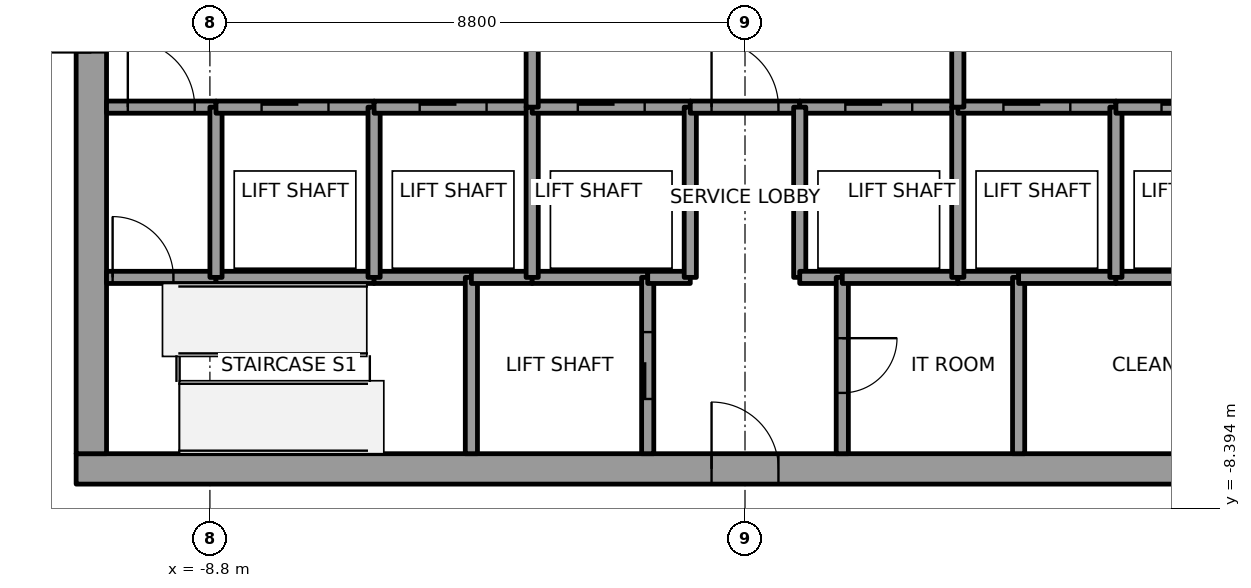
"""IFC4 building model, lengths in metres.
Left out: names, types, materials, properties, quantities, classifications, styles, units other than length and angle.
Written with IfcOpenShell. Run it as: python <this file> out.ifc"""

import sys

from ifc_helpers import new_model, si_unit, direction, frame, frame_2d, origin, place, context, subcontext, project, spatial, rectangle, extrude, element, fill, save


model = new_model("IFC4")
c1 = context("Model", 3, precision=1e-05, world=origin(), true_north=direction((0.0, 1.0)))
c2 = subcontext(c1, "Body", "Model", "MODEL_VIEW")
j1 = project(units=[si_unit("LENGTHUNIT", "METRE"), si_unit("PLANEANGLEUNIT", "RADIAN")], contexts=[c1])
p1 = place(None, origin())
s1 = spatial("IfcSite", under=j1, at=p1, CompositionType="ELEMENT")
p2 = place(p1, origin())
s2 = spatial("IfcBuilding", under=s1, at=p2, CompositionType="ELEMENT")
p3 = place(p2, frame((0.0, 0.0, 267.0)))
s3 = spatial("IfcBuildingStorey", under=s2, at=p3, CompositionType="ELEMENT", Elevation=267.0)
p4 = place(p3, frame((-11.0, -7.75, 0.0), z_axis=(0.0, 0.0, 1.0), x_axis=(1.0, 0.0, 0.0)))
e1 = element("IfcWall", 1, at=p4, inside=s3, PredefinedType="SHEAR", context=c2, shape_type="SweptSolid", body=[
    extrude(rectangle(XDim=22.0, YDim=0.5, at=frame_2d((11.0, 0.0))), origin(), (0.0, 0.0, 1.0), 4.0),
])
p5 = place(p4, frame((10.45, 0.0, 0.0)))
e2 = element("IfcOpeningElement", 2, at=p5, cuts=e1, PredefinedType="OPENING", context=c2, shape_type="SweptSolid", body=[
    extrude(rectangle(XDim=1.1, YDim=2.1, at=frame_2d((0.55, 1.05))), frame((0.0, 0.25, 0.0), z_axis=(0.0, -1.0, 0.0), x_axis=(1.0, 0.0, 0.0)), (0.0, 0.0, 1.0), 0.5),
])
p6 = place(p3, frame((-10.75, -7.5, 0.0), z_axis=(0.0, 0.0, 1.0), x_axis=(0.0, 1.0, 0.0)))
e3 = element("IfcWall", 3, at=p6, inside=s3, PredefinedType="SHEAR", context=c2, shape_type="SweptSolid", body=[
    extrude(rectangle(XDim=15.0, YDim=0.5, at=frame_2d((7.5, 0.0))), origin(), (0.0, 0.0, 1.0), 4.0),
])
p7 = place(p6, frame((6.6, 0.0, 0.0)))
e4 = element("IfcOpeningElement", 4, at=p7, cuts=e3, PredefinedType="OPENING", context=c2, shape_type="SweptSolid", body=[
    extrude(rectangle(XDim=1.8, YDim=2.1, at=frame_2d((0.9, 1.05))), frame((0.0, 0.25, 0.0), z_axis=(0.0, -1.0, 0.0), x_axis=(1.0, 0.0, 0.0)), (0.0, 0.0, 1.0), 0.5),
])
p8 = place(p3, frame((-10.5, -4.6, 0.0), z_axis=(0.0, 0.0, 1.0), x_axis=(1.0, 0.0, 0.0)))
e5 = element("IfcWall", 5, at=p8, inside=s3, PredefinedType="SOLIDWALL", context=c2, shape_type="SweptSolid", body=[
    extrude(rectangle(XDim=1.8, YDim=0.2, at=frame_2d((0.9, 0.0))), origin(), (0.0, 0.0, 1.0), 3.85),
])
p9 = place(p8, frame((0.1, 0.0, 0.0)))
e6 = element("IfcOpeningElement", 6, at=p9, cuts=e5, PredefinedType="OPENING", context=c2, shape_type="SweptSolid", body=[
    extrude(rectangle(XDim=1.0, YDim=2.1, at=frame_2d((0.5, 1.05))), frame((0.0, 0.1, 0.0), z_axis=(0.0, -1.0, 0.0), x_axis=(1.0, 0.0, 0.0)), (0.0, 0.0, 1.0), 0.2),
])
p10 = place(p3, frame((-10.5, -1.8, 0.0), z_axis=(0.0, 0.0, 1.0), x_axis=(1.0, 0.0, 0.0)))
e7 = element("IfcWall", 7, at=p10, inside=s3, PredefinedType="SOLIDWALL", context=c2, shape_type="SweptSolid", body=[
    extrude(rectangle(XDim=1.8, YDim=0.2, at=frame_2d((0.9, 0.0))), origin(), (0.0, 0.0, 1.0), 3.85),
])
p11 = place(p10, frame((0.35, 0.0, 0.0)))
e8 = element("IfcOpeningElement", 8, at=p11, cuts=e7, PredefinedType="OPENING", context=c2, shape_type="SweptSolid", body=[
    extrude(rectangle(XDim=1.1, YDim=2.1, at=frame_2d((0.55, 1.05))), frame((0.0, 0.1, 0.0), z_axis=(0.0, -1.0, 0.0), x_axis=(1.0, 0.0, 0.0)), (0.0, 0.0, 1.0), 0.2),
])
p12 = place(p3, frame((-8.7, -4.6, 0.0), z_axis=(0.0, 0.0, 1.0), x_axis=(1.0, 0.0, 0.0)))
e9 = element("IfcWall", 9, at=p12, inside=s3, PredefinedType="SOLIDWALL", context=c2, shape_type="SweptSolid", body=[
    extrude(rectangle(XDim=2.6, YDim=0.2, at=frame_2d((1.3, 0.0))), origin(), (0.0, 0.0, 1.0), 3.85),
])
p13 = place(p3, frame((-8.7, -4.6, 0.0), z_axis=(0.0, 0.0, 1.0), x_axis=(0.0, 1.0, 0.0)))
e10 = element("IfcWall", 10, at=p13, inside=s3, PredefinedType="SOLIDWALL", context=c2, shape_type="SweptSolid", body=[
    extrude(rectangle(XDim=2.8, YDim=0.2, at=frame_2d((1.4, 0.0))), origin(), (0.0, 0.0, 1.0), 3.85),
])
p14 = place(p3, frame((-8.7, -1.8, 0.0), z_axis=(0.0, 0.0, 1.0), x_axis=(1.0, 0.0, 0.0)))
e11 = element("IfcWall", 11, at=p14, inside=s3, PredefinedType="SOLIDWALL", context=c2, shape_type="SweptSolid", body=[
    extrude(rectangle(XDim=2.6, YDim=0.2, at=frame_2d((1.3, 0.0))), origin(), (0.0, 0.0, 1.0), 3.85),
])
p15 = place(p14, frame((0.75, 0.0, 0.0)))
e12 = element("IfcOpeningElement", 12, at=p15, cuts=e11, PredefinedType="OPENING", context=c2, shape_type="SweptSolid", body=[
    extrude(rectangle(XDim=1.1, YDim=2.1, at=frame_2d((0.55, 1.05))), frame((0.0, 0.1, 0.0), z_axis=(0.0, -1.0, 0.0), x_axis=(1.0, 0.0, 0.0)), (0.0, 0.0, 1.0), 0.2),
])
p16 = place(p3, frame((-6.1, -4.6, 0.0), z_axis=(0.0, 0.0, 1.0), x_axis=(1.0, 0.0, 0.0)))
e13 = element("IfcWall", 13, at=p16, inside=s3, PredefinedType="SOLIDWALL", context=c2, shape_type="SweptSolid", body=[
    extrude(rectangle(XDim=1.6, YDim=0.2, at=frame_2d((0.8, 0.0))), origin(), (0.0, 0.0, 1.0), 3.85),
])
p17 = place(p3, frame((-6.1, -4.6, 0.0), z_axis=(0.0, 0.0, 1.0), x_axis=(0.0, 1.0, 0.0)))
e14 = element("IfcWall", 14, at=p17, inside=s3, PredefinedType="SOLIDWALL", context=c2, shape_type="SweptSolid", body=[
    extrude(rectangle(XDim=2.8, YDim=0.2, at=frame_2d((1.4, 0.0))), origin(), (0.0, 0.0, 1.0), 3.85),
])
p18 = place(p3, frame((-6.1, -1.8, 0.0), z_axis=(0.0, 0.0, 1.0), x_axis=(1.0, 0.0, 0.0)))
e15 = element("IfcWall", 15, at=p18, inside=s3, PredefinedType="SOLIDWALL", context=c2, shape_type="SweptSolid", body=[
    extrude(rectangle(XDim=2.6, YDim=0.2, at=frame_2d((1.3, 0.0))), origin(), (0.0, 0.0, 1.0), 3.85),
])
p19 = place(p18, frame((0.75, 0.0, 0.0)))
e16 = element("IfcOpeningElement", 16, at=p19, cuts=e15, PredefinedType="OPENING", context=c2, shape_type="SweptSolid", body=[
    extrude(rectangle(XDim=1.1, YDim=2.1, at=frame_2d((0.55, 1.05))), frame((0.0, 0.1, 0.0), z_axis=(0.0, -1.0, 0.0), x_axis=(1.0, 0.0, 0.0)), (0.0, 0.0, 1.0), 0.2),
])
p20 = place(p3, frame((-4.5, -4.6, 0.0), z_axis=(0.0, 0.0, 1.0), x_axis=(0.0, -1.0, 0.0)))
e17 = element("IfcWall", 17, at=p20, inside=s3, PredefinedType="SOLIDWALL", context=c2, shape_type="SweptSolid", body=[
    extrude(rectangle(XDim=2.9, YDim=0.2, at=frame_2d((1.45, 0.0))), origin(), (0.0, 0.0, 1.0), 3.85),
])
p21 = place(p3, frame((-4.5, -4.6, 0.0), z_axis=(0.0, 0.0, 1.0), x_axis=(1.0, 0.0, 0.0)))
e18 = element("IfcWall", 18, at=p21, inside=s3, PredefinedType="SOLIDWALL", context=c2, shape_type="SweptSolid", body=[
    extrude(rectangle(XDim=1.0, YDim=0.2, at=frame_2d((0.5, 0.0))), origin(), (0.0, 0.0, 1.0), 3.85),
])
p22 = place(p3, frame((-3.5, -4.6, 0.0), z_axis=(0.0, 0.0, 1.0), x_axis=(1.0, 0.0, 0.0)))
e19 = element("IfcWall", 19, at=p22, inside=s3, PredefinedType="SOLIDWALL", context=c2, shape_type="SweptSolid", body=[
    extrude(rectangle(XDim=1.9, YDim=0.2, at=frame_2d((0.95, 0.0))), origin(), (0.0, 0.0, 1.0), 3.85),
])
p23 = place(p3, frame((-3.5, -4.6, 0.0), z_axis=(0.0, 0.0, 1.0), x_axis=(0.0, 1.0, 0.0)))
e20 = element("IfcWall", 20, at=p23, inside=s3, PredefinedType="SOLIDWALL", context=c2, shape_type="SweptSolid", body=[
    extrude(rectangle(XDim=2.8, YDim=0.2, at=frame_2d((1.4, 0.0))), origin(), (0.0, 0.0, 1.0), 3.85),
])
p24 = place(p3, frame((-3.5, -1.8, 0.0), z_axis=(0.0, 0.0, 1.0), x_axis=(1.0, 0.0, 0.0)))
e21 = element("IfcWall", 21, at=p24, inside=s3, PredefinedType="SOLIDWALL", context=c2, shape_type="SweptSolid", body=[
    extrude(rectangle(XDim=2.6, YDim=0.2, at=frame_2d((1.3, 0.0))), origin(), (0.0, 0.0, 1.0), 3.85),
])
p25 = place(p24, frame((0.75, 0.0, 0.0)))
e22 = element("IfcOpeningElement", 22, at=p25, cuts=e21, PredefinedType="OPENING", context=c2, shape_type="SweptSolid", body=[
    extrude(rectangle(XDim=1.1, YDim=2.1, at=frame_2d((0.55, 1.05))), frame((0.0, 0.1, 0.0), z_axis=(0.0, -1.0, 0.0), x_axis=(1.0, 0.0, 0.0)), (0.0, 0.0, 1.0), 0.2),
])
p26 = place(p3, frame((-3.5, 1.8, 0.0), z_axis=(0.0, 0.0, 1.0), x_axis=(0.0, -1.0, 0.0)))
e23 = element("IfcWall", 23, at=p26, inside=s3, PredefinedType="SOLIDWALL", context=c2, shape_type="SweptSolid", body=[
    extrude(rectangle(XDim=3.6, YDim=0.2, at=frame_2d((1.8, 0.0))), origin(), (0.0, 0.0, 1.0), 3.85),
])
p27 = place(p26, frame((1.05, 0.0, 0.0)))
e24 = element("IfcOpeningElement", 24, at=p27, cuts=e23, PredefinedType="OPENING", context=c2, shape_type="SweptSolid", body=[
    extrude(rectangle(XDim=1.5, YDim=2.1, at=frame_2d((0.75, 1.05))), frame((0.0, 0.1, 0.0), z_axis=(0.0, -1.0, 0.0), x_axis=(1.0, 0.0, 0.0)), (0.0, 0.0, 1.0), 0.2),
])
p28 = place(p3, frame((-1.6, -7.5, 0.0), z_axis=(0.0, 0.0, 1.0), x_axis=(0.0, 1.0, 0.0)))
e25 = element("IfcWall", 25, at=p28, inside=s3, PredefinedType="SOLIDWALL", context=c2, shape_type="SweptSolid", body=[
    extrude(rectangle(XDim=2.9, YDim=0.2, at=frame_2d((1.45, 0.0))), origin(), (0.0, 0.0, 1.0), 3.85),
])
p29 = place(p28, frame((0.9, 0.0, 0.0)))
e26 = element("IfcOpeningElement", 26, at=p29, cuts=e25, PredefinedType="OPENING", context=c2, shape_type="SweptSolid", body=[
    extrude(rectangle(XDim=1.1, YDim=2.1, at=frame_2d((0.55, 1.05))), frame((0.0, 0.1, 0.0), z_axis=(0.0, -1.0, 0.0), x_axis=(1.0, 0.0, 0.0)), (0.0, 0.0, 1.0), 0.2),
])
p30 = place(p3, frame((-1.6, -4.6, 0.0), z_axis=(0.0, 0.0, 1.0), x_axis=(1.0, 0.0, 0.0)))
e27 = element("IfcWall", 27, at=p30, inside=s3, PredefinedType="SOLIDWALL", context=c2, shape_type="SweptSolid", body=[
    extrude(rectangle(XDim=0.7, YDim=0.2, at=frame_2d((0.35, 0.0))), origin(), (0.0, 0.0, 1.0), 3.85),
])
p31 = place(p3, frame((-0.9, -4.6, 0.0), z_axis=(0.0, 0.0, 1.0), x_axis=(0.0, 1.0, 0.0)))
e28 = element("IfcWall", 28, at=p31, inside=s3, PredefinedType="SOLIDWALL", context=c2, shape_type="SweptSolid", body=[
    extrude(rectangle(XDim=2.8, YDim=0.2, at=frame_2d((1.4, 0.0))), origin(), (0.0, 0.0, 1.0), 3.85),
])
p32 = place(p3, frame((-0.9, -1.8, 0.0), z_axis=(0.0, 0.0, 1.0), x_axis=(1.0, 0.0, 0.0)))
e29 = element("IfcWall", 29, at=p32, inside=s3, PredefinedType="SOLIDWALL", context=c2, shape_type="SweptSolid", body=[
    extrude(rectangle(XDim=1.8, YDim=0.2, at=frame_2d((0.9, 0.0))), origin(), (0.0, 0.0, 1.0), 3.85),
])
p33 = place(p32, frame((0.35, 0.0, 0.0)))
e30 = element("IfcOpeningElement", 30, at=p33, cuts=e29, PredefinedType="OPENING", context=c2, shape_type="SweptSolid", body=[
    extrude(rectangle(XDim=1.1, YDim=2.1, at=frame_2d((0.55, 1.05))), frame((0.0, 0.1, 0.0), z_axis=(0.0, -1.0, 0.0), x_axis=(1.0, 0.0, 0.0)), (0.0, 0.0, 1.0), 0.2),
])
p34 = place(p3, frame((0.9, -1.8, 0.0), z_axis=(0.0, 0.0, 1.0), x_axis=(1.0, 0.0, 0.0)))
e31 = element("IfcWall", 31, at=p34, inside=s3, PredefinedType="SOLIDWALL", context=c2, shape_type="SweptSolid", body=[
    extrude(rectangle(XDim=2.6, YDim=0.2, at=frame_2d((1.3, 0.0))), origin(), (0.0, 0.0, 1.0), 3.85),
])
p35 = place(p34, frame((0.75, 0.0, 0.0)))
e32 = element("IfcOpeningElement", 32, at=p35, cuts=e31, PredefinedType="OPENING", context=c2, shape_type="SweptSolid", body=[
    extrude(rectangle(XDim=1.1, YDim=2.1, at=frame_2d((0.55, 1.05))), frame((0.0, 0.1, 0.0), z_axis=(0.0, -1.0, 0.0), x_axis=(1.0, 0.0, 0.0)), (0.0, 0.0, 1.0), 0.2),
])
p36 = place(p3, frame((0.9, -1.8, 0.0), z_axis=(0.0, 0.0, 1.0), x_axis=(0.0, -1.0, 0.0)))
e33 = element("IfcWall", 33, at=p36, inside=s3, PredefinedType="SOLIDWALL", context=c2, shape_type="SweptSolid", body=[
    extrude(rectangle(XDim=2.8, YDim=0.2, at=frame_2d((1.4, 0.0))), origin(), (0.0, 0.0, 1.0), 3.85),
])
p37 = place(p3, frame((0.9, -4.6, 0.0), z_axis=(0.0, 0.0, 1.0), x_axis=(1.0, 0.0, 0.0)))
e34 = element("IfcWall", 34, at=p37, inside=s3, PredefinedType="SOLIDWALL", context=c2, shape_type="SweptSolid", body=[
    extrude(rectangle(XDim=0.7, YDim=0.2, at=frame_2d((0.35, 0.0))), origin(), (0.0, 0.0, 1.0), 3.85),
])
p38 = place(p3, frame((1.6, -4.6, 0.0), z_axis=(0.0, 0.0, 1.0), x_axis=(0.0, -1.0, 0.0)))
e35 = element("IfcWall", 35, at=p38, inside=s3, PredefinedType="SOLIDWALL", context=c2, shape_type="SweptSolid", body=[
    extrude(rectangle(XDim=2.9, YDim=0.2, at=frame_2d((1.45, 0.0))), origin(), (0.0, 0.0, 1.0), 3.85),
])
p39 = place(p38, frame((1.0, 0.0, 0.0)))
e36 = element("IfcOpeningElement", 36, at=p39, cuts=e35, PredefinedType="OPENING", context=c2, shape_type="SweptSolid", body=[
    extrude(rectangle(XDim=0.9, YDim=2.1, at=frame_2d((0.45, 1.05))), frame((0.0, 0.1, 0.0), z_axis=(0.0, -1.0, 0.0), x_axis=(1.0, 0.0, 0.0)), (0.0, 0.0, 1.0), 0.2),
])
p40 = place(p3, frame((3.5, -4.6, 0.0), z_axis=(0.0, 0.0, 1.0), x_axis=(-1.0, 0.0, 0.0)))
e37 = element("IfcWall", 37, at=p40, inside=s3, PredefinedType="SOLIDWALL", context=c2, shape_type="SweptSolid", body=[
    extrude(rectangle(XDim=1.9, YDim=0.2, at=frame_2d((0.95, 0.0))), origin(), (0.0, 0.0, 1.0), 3.85),
])
p41 = place(p3, frame((4.5, -4.6, 0.0), z_axis=(0.0, 0.0, 1.0), x_axis=(-1.0, 0.0, 0.0)))
e38 = element("IfcWall", 38, at=p41, inside=s3, PredefinedType="SOLIDWALL", context=c2, shape_type="SweptSolid", body=[
    extrude(rectangle(XDim=1.0, YDim=0.2, at=frame_2d((0.5, 0.0))), origin(), (0.0, 0.0, 1.0), 3.85),
])
p42 = place(p3, frame((3.5, -4.6, 0.0), z_axis=(0.0, 0.0, 1.0), x_axis=(0.0, 1.0, 0.0)))
e39 = element("IfcWall", 39, at=p42, inside=s3, PredefinedType="SOLIDWALL", context=c2, shape_type="SweptSolid", body=[
    extrude(rectangle(XDim=2.8, YDim=0.2, at=frame_2d((1.4, 0.0))), origin(), (0.0, 0.0, 1.0), 3.85),
])
p43 = place(p3, frame((3.5, -1.8, 0.0), z_axis=(0.0, 0.0, 1.0), x_axis=(1.0, 0.0, 0.0)))
e40 = element("IfcWall", 40, at=p43, inside=s3, PredefinedType="SOLIDWALL", context=c2, shape_type="SweptSolid", body=[
    extrude(rectangle(XDim=2.6, YDim=0.2, at=frame_2d((1.3, 0.0))), origin(), (0.0, 0.0, 1.0), 3.85),
])
p44 = place(p43, frame((0.75, 0.0, 0.0)))
e41 = element("IfcOpeningElement", 41, at=p44, cuts=e40, PredefinedType="OPENING", context=c2, shape_type="SweptSolid", body=[
    extrude(rectangle(XDim=1.1, YDim=2.1, at=frame_2d((0.55, 1.05))), frame((0.0, 0.1, 0.0), z_axis=(0.0, -1.0, 0.0), x_axis=(1.0, 0.0, 0.0)), (0.0, 0.0, 1.0), 0.2),
])
p45 = place(p3, frame((3.5, -1.8, 0.0), z_axis=(0.0, 0.0, 1.0), x_axis=(0.0, 1.0, 0.0)))
e42 = element("IfcWall", 42, at=p45, inside=s3, PredefinedType="SOLIDWALL", context=c2, shape_type="SweptSolid", body=[
    extrude(rectangle(XDim=3.6, YDim=0.2, at=frame_2d((1.8, 0.0))), origin(), (0.0, 0.0, 1.0), 3.85),
])
p46 = place(p45, frame((1.05, 0.0, 0.0)))
e43 = element("IfcOpeningElement", 43, at=p46, cuts=e42, PredefinedType="OPENING", context=c2, shape_type="SweptSolid", body=[
    extrude(rectangle(XDim=1.5, YDim=2.1, at=frame_2d((0.75, 1.05))), frame((0.0, 0.1, 0.0), z_axis=(0.0, -1.0, 0.0), x_axis=(1.0, 0.0, 0.0)), (0.0, 0.0, 1.0), 0.2),
])
p47 = place(p3, frame((4.5, -4.6, 0.0), z_axis=(0.0, 0.0, 1.0), x_axis=(0.0, -1.0, 0.0)))
e44 = element("IfcWall", 44, at=p47, inside=s3, PredefinedType="SOLIDWALL", context=c2, shape_type="SweptSolid", body=[
    extrude(rectangle(XDim=2.9, YDim=0.2, at=frame_2d((1.45, 0.0))), origin(), (0.0, 0.0, 1.0), 3.85),
])
p48 = place(p3, frame((6.1, -4.6, 0.0), z_axis=(0.0, 0.0, 1.0), x_axis=(-1.0, 0.0, 0.0)))
e45 = element("IfcWall", 45, at=p48, inside=s3, PredefinedType="SOLIDWALL", context=c2, shape_type="SweptSolid", body=[
    extrude(rectangle(XDim=1.6, YDim=0.2, at=frame_2d((0.8, 0.0))), origin(), (0.0, 0.0, 1.0), 3.85),
])
p49 = place(p3, frame((8.7, -4.6, 0.0), z_axis=(0.0, 0.0, 1.0), x_axis=(-1.0, 0.0, 0.0)))
e46 = element("IfcWall", 46, at=p49, inside=s3, PredefinedType="SOLIDWALL", context=c2, shape_type="SweptSolid", body=[
    extrude(rectangle(XDim=2.6, YDim=0.2, at=frame_2d((1.3, 0.0))), origin(), (0.0, 0.0, 1.0), 3.85),
])
p50 = place(p3, frame((6.1, -4.6, 0.0), z_axis=(0.0, 0.0, 1.0), x_axis=(0.0, 1.0, 0.0)))
e47 = element("IfcWall", 47, at=p50, inside=s3, PredefinedType="SOLIDWALL", context=c2, shape_type="SweptSolid", body=[
    extrude(rectangle(XDim=2.8, YDim=0.2, at=frame_2d((1.4, 0.0))), origin(), (0.0, 0.0, 1.0), 3.85),
])
p51 = place(p3, frame((6.1, -1.8, 0.0), z_axis=(0.0, 0.0, 1.0), x_axis=(1.0, 0.0, 0.0)))
e48 = element("IfcWall", 48, at=p51, inside=s3, PredefinedType="SOLIDWALL", context=c2, shape_type="SweptSolid", body=[
    extrude(rectangle(XDim=2.6, YDim=0.2, at=frame_2d((1.3, 0.0))), origin(), (0.0, 0.0, 1.0), 3.85),
])
p52 = place(p51, frame((0.75, 0.0, 0.0)))
e49 = element("IfcOpeningElement", 49, at=p52, cuts=e48, PredefinedType="OPENING", context=c2, shape_type="SweptSolid", body=[
    extrude(rectangle(XDim=1.1, YDim=2.1, at=frame_2d((0.55, 1.05))), frame((0.0, 0.1, 0.0), z_axis=(0.0, -1.0, 0.0), x_axis=(1.0, 0.0, 0.0)), (0.0, 0.0, 1.0), 0.2),
])
p53 = place(p15, origin())
e50 = element("IfcDoor", 50, at=p53, inside=s3, OperationType="SLIDING_TO_LEFT", PredefinedType="DOOR", context=c2, shape_type="SweptSolid", body=[
    extrude(rectangle(XDim=1.1, YDim=2.1, at=frame_2d((0.55, 1.05))), frame((0.0, 0.025, 0.0), z_axis=(0.0, -1.0, 0.0), x_axis=(1.0, 0.0, 0.0)), (0.0, 0.0, 1.0), 0.05),
])
fill(e12, e50)
p54 = place(p19, origin())
e51 = element("IfcDoor", 51, at=p54, inside=s3, OperationType="SLIDING_TO_LEFT", PredefinedType="DOOR", context=c2, shape_type="SweptSolid", body=[
    extrude(rectangle(XDim=1.1, YDim=2.1, at=frame_2d((0.55, 1.05))), frame((0.0, 0.025, 0.0), z_axis=(0.0, -1.0, 0.0), x_axis=(1.0, 0.0, 0.0)), (0.0, 0.0, 1.0), 0.05),
])
fill(e16, e51)
p55 = place(p25, origin())
e52 = element("IfcDoor", 52, at=p55, inside=s3, OperationType="SLIDING_TO_LEFT", PredefinedType="DOOR", context=c2, shape_type="SweptSolid", body=[
    extrude(rectangle(XDim=1.1, YDim=2.1, at=frame_2d((0.55, 1.05))), frame((0.0, 0.025, 0.0), z_axis=(0.0, -1.0, 0.0), x_axis=(1.0, 0.0, 0.0)), (0.0, 0.0, 1.0), 0.05),
])
fill(e22, e52)
p56 = place(p35, origin())
e53 = element("IfcDoor", 53, at=p56, inside=s3, OperationType="SLIDING_TO_RIGHT", PredefinedType="DOOR", context=c2, shape_type="SweptSolid", body=[
    extrude(rectangle(XDim=1.1, YDim=2.1, at=frame_2d((0.55, 1.05))), frame((0.0, 0.025, 0.0), z_axis=(0.0, -1.0, 0.0), x_axis=(1.0, 0.0, 0.0)), (0.0, 0.0, 1.0), 0.05),
])
fill(e32, e53)
p57 = place(p44, origin())
e54 = element("IfcDoor", 54, at=p57, inside=s3, OperationType="SLIDING_TO_LEFT", PredefinedType="DOOR", context=c2, shape_type="SweptSolid", body=[
    extrude(rectangle(XDim=1.1, YDim=2.1, at=frame_2d((0.55, 1.05))), frame((0.0, 0.025, 0.0), z_axis=(0.0, -1.0, 0.0), x_axis=(1.0, 0.0, 0.0)), (0.0, 0.0, 1.0), 0.05),
])
fill(e41, e54)
p58 = place(p52, origin())
e55 = element("IfcDoor", 55, at=p58, inside=s3, OperationType="SLIDING_TO_RIGHT", PredefinedType="DOOR", context=c2, shape_type="SweptSolid", body=[
    extrude(rectangle(XDim=1.1, YDim=2.1, at=frame_2d((0.55, 1.05))), frame((0.0, 0.025, 0.0), z_axis=(0.0, -1.0, 0.0), x_axis=(1.0, 0.0, 0.0)), (0.0, 0.0, 1.0), 0.05),
])
fill(e49, e55)
p59 = place(p29, origin())
e56 = element("IfcDoor", 56, at=p59, inside=s3, OperationType="SLIDING_TO_LEFT", PredefinedType="DOOR", context=c2, shape_type="SweptSolid", body=[
    extrude(rectangle(XDim=1.1, YDim=2.1, at=frame_2d((0.55, 1.05))), frame((0.0, 0.025, 0.0), z_axis=(0.0, -1.0, 0.0), x_axis=(1.0, 0.0, 0.0)), (0.0, 0.0, 1.0), 0.05),
])
fill(e26, e56)
p60 = place(p11, origin())
e57 = element("IfcDoor", 57, at=p60, inside=s3, OperationType="SINGLE_SWING_RIGHT", PredefinedType="DOOR", context=c2, shape_type="SweptSolid", body=[
    extrude(rectangle(XDim=1.1, YDim=2.1, at=frame_2d((0.55, 1.05))), frame((0.0, 0.025, 0.0), z_axis=(0.0, -1.0, 0.0), x_axis=(1.0, 0.0, 0.0)), (0.0, 0.0, 1.0), 0.05),
])
fill(e8, e57)
p61 = place(p33, origin())
e58 = element("IfcDoor", 58, at=p61, inside=s3, OperationType="SINGLE_SWING_LEFT", PredefinedType="DOOR", context=c2, shape_type="SweptSolid", body=[
    extrude(rectangle(XDim=1.1, YDim=2.1, at=frame_2d((0.55, 1.05))), frame((0.0, 0.025, 0.0), z_axis=(0.0, -1.0, 0.0), x_axis=(1.0, 0.0, 0.0)), (0.0, 0.0, 1.0), 0.05),
])
fill(e30, e58)
p62 = place(p9, origin())
e59 = element("IfcDoor", 59, at=p62, inside=s3, OperationType="SINGLE_SWING_LEFT", PredefinedType="DOOR", context=c2, shape_type="SweptSolid", body=[
    extrude(rectangle(XDim=1.0, YDim=2.1, at=frame_2d((0.5, 1.05))), frame((0.0, 0.025, 0.0), z_axis=(0.0, -1.0, 0.0), x_axis=(1.0, 0.0, 0.0)), (0.0, 0.0, 1.0), 0.05),
])
fill(e6, e59)
p63 = place(p39, origin())
e60 = element("IfcDoor", 60, at=p63, inside=s3, OperationType="SINGLE_SWING_RIGHT", PredefinedType="DOOR", context=c2, shape_type="SweptSolid", body=[
    extrude(rectangle(XDim=0.9, YDim=2.1, at=frame_2d((0.45, 1.05))), frame((0.0, 0.025, 0.0), z_axis=(0.0, -1.0, 0.0), x_axis=(1.0, 0.0, 0.0)), (0.0, 0.0, 1.0), 0.05),
])
fill(e36, e60)
p64 = place(p7, origin())
e61 = element("IfcDoor", 61, at=p64, inside=s3, OperationType="DOUBLE_DOOR_SINGLE_SWING", PredefinedType="DOOR", context=c2, shape_type="SweptSolid", body=[
    extrude(rectangle(XDim=1.8, YDim=2.1, at=frame_2d((0.9, 1.05))), frame((0.0, 0.025, 0.0), z_axis=(0.0, -1.0, 0.0), x_axis=(1.0, 0.0, 0.0)), (0.0, 0.0, 1.0), 0.05),
])
fill(e4, e61)
p65 = place(p5, origin())
e62 = element("IfcDoor", 62, at=p65, inside=s3, OperationType="SINGLE_SWING_LEFT", PredefinedType="DOOR", context=c2, shape_type="SweptSolid", body=[
    extrude(rectangle(XDim=1.1, YDim=2.1, at=frame_2d((0.55, 1.05))), frame((0.0, 0.025, 0.0), z_axis=(0.0, -1.0, 0.0), x_axis=(1.0, 0.0, 0.0)), (0.0, 0.0, 1.0), 0.05),
])
fill(e2, e62)
save(model, sys.argv[1])
